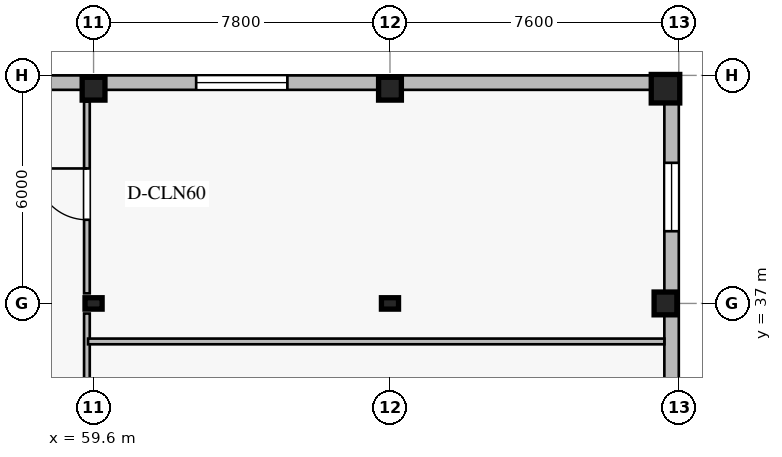
"""IFC4 building model, lengths in metres.
Left out: names, types, materials, properties, quantities, classifications, styles, units other than length and angle.
Written with IfcOpenShell. Run it as: python <this file> out.ifc"""

import sys

from ifc_helpers import new_model, si_unit, direction, frame, frame_2d, origin, origin_2d, place, context, subcontext, project, spatial, rectangle, i_section, extrude, element, fill, save


model = new_model("IFC4")
c1 = context("Model", 3, precision=1e-05, world=origin(), true_north=direction((0.0, 1.0)))
c2 = subcontext(c1, "Body", "Model", "MODEL_VIEW")
j1 = project(units=[si_unit("LENGTHUNIT", "METRE"), si_unit("PLANEANGLEUNIT", "RADIAN")], contexts=[c1])
p1 = place(None, origin())
s1 = spatial("IfcSite", under=j1, at=p1, CompositionType="ELEMENT")
p2 = place(p1, origin())
s2 = spatial("IfcBuilding", under=s1, at=p2, CompositionType="ELEMENT")
p3 = place(p2, frame((0.0, 0.0, 9.8)))
s3 = spatial("IfcBuildingStorey", under=s2, at=p3, CompositionType="ELEMENT", Elevation=9.8)
p4 = place(p3, frame((59.6, 37.0, 0.0), z_axis=(0.0, 0.0, 1.0), x_axis=(1.0, 0.0, 0.0)))
e1 = element("IfcColumn", 1, at=p4, inside=s3, PredefinedType="COLUMN", context=c2, shape_type="SweptSolid", body=[
    extrude(i_section(OverallWidth=0.3, OverallDepth=0.45, WebThickness=0.014, FlangeThickness=0.026, at=origin_2d()), origin(), (0.0, 0.0, 1.0), 4.6),
])
p5 = place(p3, frame((59.6, 42.65, 0.0), z_axis=(0.0, 0.0, 1.0), x_axis=(1.0, 0.0, 0.0)))
e2 = element("IfcColumn", 2, at=p5, inside=s3, PredefinedType="COLUMN", context=c2, shape_type="SweptSolid", body=[
    extrude(rectangle(XDim=0.6, YDim=0.6, at=origin_2d()), origin(), (0.0, 0.0, 1.0), 4.6),
])
p6 = place(p3, frame((67.4, 37.0, 0.0), z_axis=(0.0, 0.0, 1.0), x_axis=(1.0, 0.0, 0.0)))
e3 = element("IfcColumn", 3, at=p6, inside=s3, PredefinedType="COLUMN", context=c2, shape_type="SweptSolid", body=[
    extrude(i_section(OverallWidth=0.3, OverallDepth=0.45, WebThickness=0.014, FlangeThickness=0.026, at=origin_2d()), origin(), (0.0, 0.0, 1.0), 4.6),
])
for number, where, z_axis, x_axis in (
    (4, (67.4, 42.65, 0.0), (0.0, 0.0, 1.0), (1.0, 0.0, 0.0)),
    (5, (74.65, 37.0, 0.0), (0.0, 0.0, 1.0), (1.0, 0.0, 0.0)),
):
    element("IfcColumn", number, at=place(p3, frame(where, z_axis=z_axis, x_axis=x_axis)), inside=s3, PredefinedType="COLUMN", context=c2, shape_type="SweptSolid", body=[
        extrude(rectangle(XDim=0.6, YDim=0.6, at=origin_2d()), origin(), (0.0, 0.0, 1.0), 4.6),
    ])
p7 = place(p3, frame((74.65, 42.65, 0.0), z_axis=(0.0, 0.0, 1.0), x_axis=(1.0, 0.0, 0.0)))
e6 = element("IfcColumn", 6, at=p7, inside=s3, PredefinedType="COLUMN", context=c2, shape_type="SweptSolid", body=[
    extrude(rectangle(XDim=0.75, YDim=0.75, at=origin_2d()), origin(), (0.0, 0.0, 1.0), 4.6),
])
p8 = place(p3, frame((52.0, 42.81, 0.0), z_axis=(0.0, 0.0, 1.0), x_axis=(1.0, 0.0, 0.0)))
e7 = element("IfcWall", 7, at=p8, inside=s3, PredefinedType="STANDARD", context=c2, shape_type="SweptSolid", body=[
    extrude(rectangle(XDim=23.0, YDim=0.38, at=frame_2d((11.5, 0.0))), origin(), (0.0, 0.0, 1.0), 4.34),
])
p9 = place(p8, frame((10.3, 0.0, 0.95)))
e8 = element("IfcOpeningElement", 8, at=p9, cuts=e7, PredefinedType="OPENING", context=c2, shape_type="SweptSolid", body=[
    extrude(rectangle(XDim=2.4, YDim=1.8, at=frame_2d((1.2, 0.9))), frame((0.0, 0.2, 0.0), z_axis=(0.0, -1.0, 0.0), x_axis=(1.0, 0.0, 0.0)), (0.0, 0.0, 1.0), 0.4),
])
p10 = place(p3, frame((74.81, 42.62, 0.0), z_axis=(0.0, 0.0, 1.0), x_axis=(0.0, -1.0, 0.0)))
e9 = element("IfcWall", 9, at=p10, inside=s3, PredefinedType="STANDARD", context=c2, shape_type="SweptSolid", body=[
    extrude(rectangle(XDim=35.24, YDim=0.38, at=frame_2d((17.62, 0.0))), origin(), (0.0, 0.0, 1.0), 4.34),
])
p11 = place(p10, frame((31.52, 0.0, 0.9)))
e10 = element("IfcOpeningElement", 10, at=p11, cuts=e9, PredefinedType="OPENING", context=c2, shape_type="SweptSolid", body=[
    extrude(rectangle(XDim=1.8, YDim=1.8, at=frame_2d((0.9, 0.9))), frame((0.0, 0.2, 0.0), z_axis=(0.0, -1.0, 0.0), x_axis=(1.0, 0.0, 0.0)), (0.0, 0.0, 1.0), 0.4),
])
p12 = place(p10, frame((25.72, 0.0, 0.9)))
e11 = element("IfcOpeningElement", 11, at=p12, cuts=e9, PredefinedType="OPENING", context=c2, shape_type="SweptSolid", body=[
    extrude(rectangle(XDim=1.8, YDim=1.8, at=frame_2d((0.9, 0.9))), frame((0.0, 0.2, 0.0), z_axis=(0.0, -1.0, 0.0), x_axis=(1.0, 0.0, 0.0)), (0.0, 0.0, 1.0), 0.4),
])
p13 = place(p10, frame((19.72, 0.0, 0.9)))
e12 = element("IfcOpeningElement", 12, at=p13, cuts=e9, PredefinedType="OPENING", context=c2, shape_type="SweptSolid", body=[
    extrude(rectangle(XDim=1.5, YDim=1.5, at=frame_2d((0.75, 0.75))), frame((0.0, 0.2, 0.0), z_axis=(0.0, -1.0, 0.0), x_axis=(1.0, 0.0, 0.0)), (0.0, 0.0, 1.0), 0.4),
])
p14 = place(p10, frame((13.72, 0.0, 0.9)))
e13 = element("IfcOpeningElement", 13, at=p14, cuts=e9, PredefinedType="OPENING", context=c2, shape_type="SweptSolid", body=[
    extrude(rectangle(XDim=1.5, YDim=1.5, at=frame_2d((0.75, 0.75))), frame((0.0, 0.2, 0.0), z_axis=(0.0, -1.0, 0.0), x_axis=(1.0, 0.0, 0.0)), (0.0, 0.0, 1.0), 0.4),
])
p15 = place(p10, frame((7.72, 0.0, 0.9)))
e14 = element("IfcOpeningElement", 14, at=p15, cuts=e9, PredefinedType="OPENING", context=c2, shape_type="SweptSolid", body=[
    extrude(rectangle(XDim=1.8, YDim=1.8, at=frame_2d((0.9, 0.9))), frame((0.0, 0.2, 0.0), z_axis=(0.0, -1.0, 0.0), x_axis=(1.0, 0.0, 0.0)), (0.0, 0.0, 1.0), 0.4),
])
p16 = place(p10, frame((1.92, 0.0, 0.9)))
e15 = element("IfcOpeningElement", 15, at=p16, cuts=e9, PredefinedType="OPENING", context=c2, shape_type="SweptSolid", body=[
    extrude(rectangle(XDim=1.8, YDim=1.8, at=frame_2d((0.9, 0.9))), frame((0.0, 0.2, 0.0), z_axis=(0.0, -1.0, 0.0), x_axis=(1.0, 0.0, 0.0)), (0.0, 0.0, 1.0), 0.4),
])
p17 = place(p3, frame((59.425, 31.265, 0.0), z_axis=(0.0, 0.0, 1.0), x_axis=(0.0, 1.0, 0.0)))
e16 = element("IfcWall", 16, at=p17, inside=s3, PredefinedType="PARTITIONING", context=c2, shape_type="SweptSolid", body=[
    extrude(rectangle(XDim=5.47, YDim=0.15, at=frame_2d((2.735, 0.0))), origin(), (0.0, 0.0, 1.0), 3.98),
])
p18 = place(p3, frame((59.425, 37.265, 0.0), z_axis=(0.0, 0.0, 1.0), x_axis=(0.0, 1.0, 0.0)))
e17 = element("IfcWall", 17, at=p18, inside=s3, PredefinedType="PARTITIONING", context=c2, shape_type="SweptSolid", body=[
    extrude(rectangle(XDim=5.045, YDim=0.15, at=frame_2d((2.522, 0.0))), origin(), (0.0, 0.0, 1.0), 3.98),
])
p19 = place(p18, frame((1.936, 0.0, 0.0)))
e18 = element("IfcOpeningElement", 18, at=p19, cuts=e17, PredefinedType="OPENING", context=c2, shape_type="SweptSolid", body=[
    extrude(rectangle(XDim=1.35, YDim=2.2, at=frame_2d((0.675, 1.1))), frame((0.0, 0.085, 0.0), z_axis=(0.0, -1.0, 0.0), x_axis=(1.0, 0.0, 0.0)), (0.0, 0.0, 1.0), 0.17),
])
p20 = place(p3, frame((59.455, 36.0, 0.0), z_axis=(0.0, 0.0, 1.0), x_axis=(1.0, 0.0, 0.0)))
e19 = element("IfcWall", 19, at=p20, inside=s3, PredefinedType="PARTITIONING", context=c2, shape_type="SweptSolid", body=[
    extrude(rectangle(XDim=15.165, YDim=0.15, at=frame_2d((7.583, 0.0))), origin(), (0.0, 0.0, 1.0), 3.98),
])
p21 = place(p16, origin())
e20 = element("IfcWindow", 20, at=p21, inside=s3, PartitioningType="DOUBLE_PANEL_VERTICAL", PredefinedType="WINDOW", context=c2, shape_type="SweptSolid", body=[
    extrude(rectangle(XDim=1.8, YDim=1.8, at=frame_2d((0.9, 0.9))), frame((0.0, 0.03, 0.0), z_axis=(0.0, -1.0, 0.0), x_axis=(1.0, 0.0, 0.0)), (0.0, 0.0, 1.0), 0.06),
])
fill(e15, e20)
p22 = place(p9, origin())
e21 = element("IfcWindow", 21, at=p22, inside=s3, PartitioningType="TRIPLE_PANEL_VERTICAL", PredefinedType="WINDOW", context=c2, shape_type="SweptSolid", body=[
    extrude(rectangle(XDim=2.4, YDim=1.8, at=frame_2d((1.2, 0.9))), frame((0.0, 0.03, 0.0), z_axis=(0.0, -1.0, 0.0), x_axis=(1.0, 0.0, 0.0)), (0.0, 0.0, 1.0), 0.06),
])
fill(e8, e21)
p23 = place(p19, origin())
e22 = element("IfcDoor", 22, at=p23, inside=s3, OperationType="SINGLE_SWING_RIGHT", PredefinedType="DOOR", context=c2, shape_type="SweptSolid", body=[
    extrude(rectangle(XDim=1.35, YDim=2.2, at=frame_2d((0.675, 1.1))), frame((0.0, 0.025, 0.0), z_axis=(0.0, -1.0, 0.0), x_axis=(1.0, 0.0, 0.0)), (0.0, 0.0, 1.0), 0.05),
])
fill(e18, e22)
save(model, sys.argv[1])
